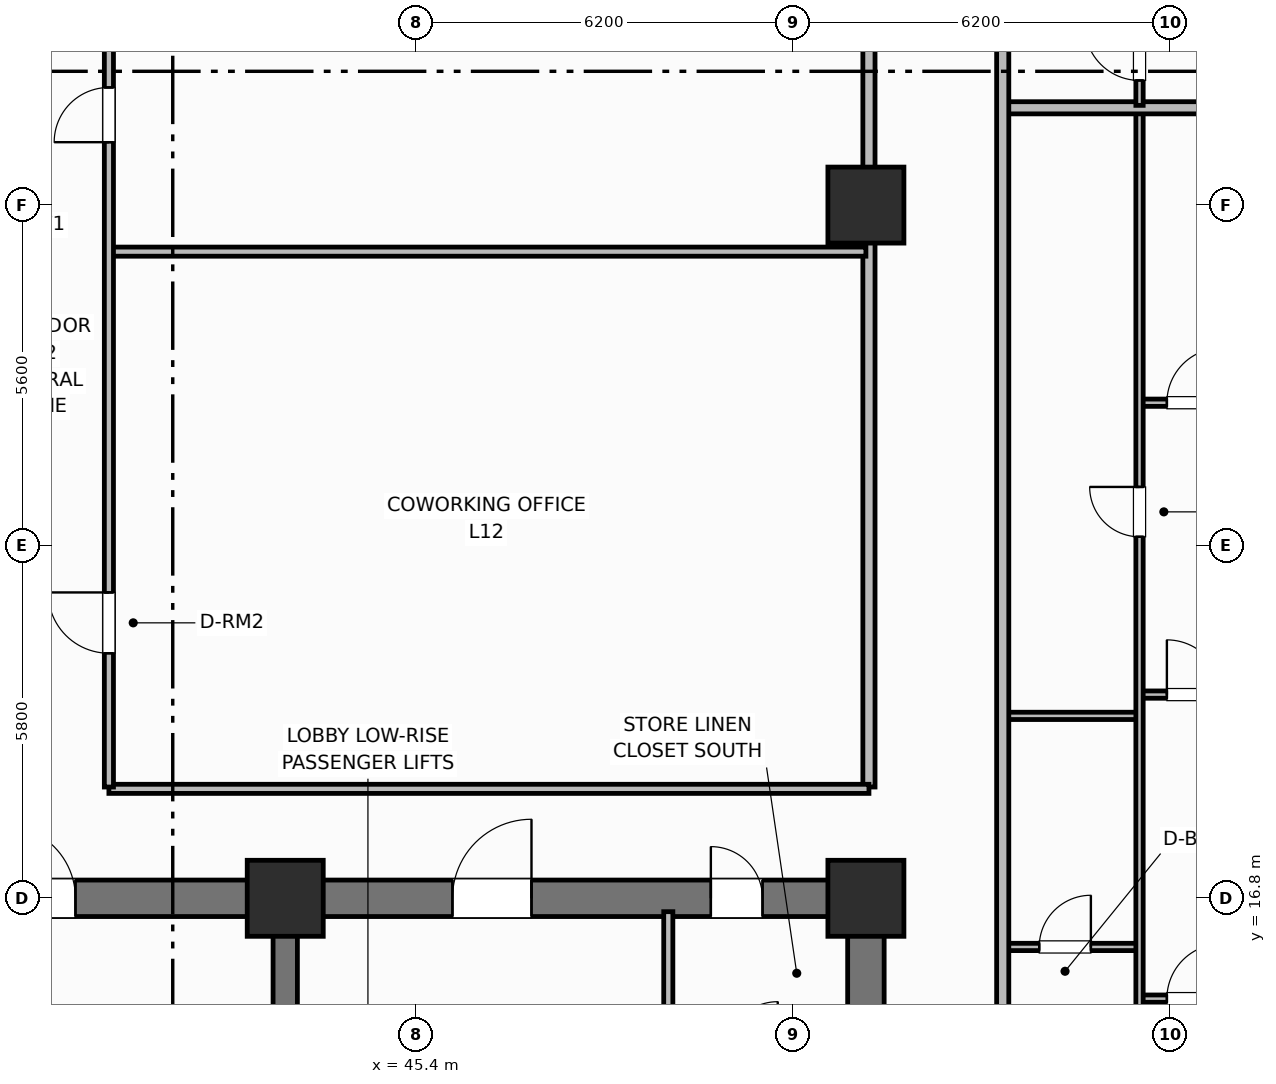
"""IFC4 building model, lengths in metres.
Left out: names, types, materials, properties, quantities, classifications, styles, units other than length and angle.
Written with IfcOpenShell. Run it as: python <this file> out.ifc"""

import sys

from ifc_helpers import new_model, si_unit, direction, frame, frame_2d, origin, origin_2d, place, context, subcontext, project, spatial, rectangle, extrude, element, fill, save


model = new_model("IFC4")
c1 = context("Model", 3, precision=1e-05, world=origin(), true_north=direction((0.0, 1.0)))
c2 = subcontext(c1, "Body", "Model", "MODEL_VIEW")
j1 = project(units=[si_unit("LENGTHUNIT", "METRE"), si_unit("PLANEANGLEUNIT", "RADIAN")], contexts=[c1])
p1 = place(None, origin())
s1 = spatial("IfcSite", under=j1, at=p1, CompositionType="ELEMENT")
p2 = place(p1, origin())
s2 = spatial("IfcBuilding", under=s1, at=p2, CompositionType="ELEMENT")
p3 = place(p2, frame((0.0, 0.0, 51.0)))
s3 = spatial("IfcBuildingStorey", under=s2, at=p3, CompositionType="ELEMENT", Elevation=51.0)
p4 = place(p3, frame((52.8, 10.9, 0.0), z_axis=(0.0, 0.0, 1.0), x_axis=(0.0, 1.0, 0.0)))
e1 = element("IfcWall", 1, at=p4, inside=s3, PredefinedType="SHEAR", context=c2, shape_type="SweptSolid", body=[
    extrude(rectangle(XDim=5.6, YDim=0.6, at=frame_2d((2.8, 0.0))), origin(), (0.0, 0.0, 1.0), 3.7),
])
p5 = place(p3, frame((25.6, 16.8, 0.0), z_axis=(0.0, 0.0, 1.0), x_axis=(1.0, 0.0, 0.0)))
e2 = element("IfcWall", 2, at=p5, inside=s3, PredefinedType="SHEAR", context=c2, shape_type="SweptSolid", body=[
    extrude(rectangle(XDim=27.2, YDim=0.6, at=frame_2d((13.6, 0.0))), origin(), (0.0, 0.0, 1.0), 3.7),
])
p6 = place(p5, frame((1.8, 0.0, 0.0)))
e3 = element("IfcOpeningElement", 3, at=p6, cuts=e2, PredefinedType="OPENING", context=c2, shape_type="SweptSolid", body=[
    extrude(rectangle(XDim=1.1, YDim=2.15, at=frame_2d((0.55, 1.075))), frame((0.0, 0.31, 0.0), z_axis=(0.0, -1.0, 0.0), x_axis=(1.0, 0.0, 0.0)), (0.0, 0.0, 1.0), 0.62),
])
p7 = place(p5, frame((5.6, 0.0, 0.0)))
e4 = element("IfcOpeningElement", 4, at=p7, cuts=e2, PredefinedType="OPENING", context=c2, shape_type="SweptSolid", body=[
    extrude(rectangle(XDim=0.85, YDim=2.1, at=frame_2d((0.425, 1.05))), frame((0.0, 0.31, 0.0), z_axis=(0.0, -1.0, 0.0), x_axis=(1.0, 0.0, 0.0)), (0.0, 0.0, 1.0), 0.62),
])
p8 = place(p5, frame((13.0, 0.0, 0.0)))
e5 = element("IfcOpeningElement", 5, at=p8, cuts=e2, PredefinedType="OPENING", context=c2, shape_type="SweptSolid", body=[
    extrude(rectangle(XDim=1.2, YDim=2.15, at=frame_2d((0.6, 1.075))), frame((0.0, 0.31, 0.0), z_axis=(0.0, -1.0, 0.0), x_axis=(1.0, 0.0, 0.0)), (0.0, 0.0, 1.0), 0.62),
])
p9 = place(p5, frame((20.4, 0.0, 0.0)))
e6 = element("IfcOpeningElement", 6, at=p9, cuts=e2, PredefinedType="OPENING", context=c2, shape_type="SweptSolid", body=[
    extrude(rectangle(XDim=1.3, YDim=2.2, at=frame_2d((0.65, 1.1))), frame((0.0, 0.31, 0.0), z_axis=(0.0, -1.0, 0.0), x_axis=(1.0, 0.0, 0.0)), (0.0, 0.0, 1.0), 0.62),
])
p10 = place(p5, frame((24.65, 0.0, 0.0)))
e7 = element("IfcOpeningElement", 7, at=p10, cuts=e2, PredefinedType="OPENING", context=c2, shape_type="SweptSolid", body=[
    extrude(rectangle(XDim=0.85, YDim=2.1, at=frame_2d((0.425, 1.05))), frame((0.0, 0.31, 0.0), z_axis=(0.0, -1.0, 0.0), x_axis=(1.0, 0.0, 0.0)), (0.0, 0.0, 1.0), 0.62),
])
p11 = place(p3, frame((43.25, 10.9, 0.0), z_axis=(0.0, 0.0, 1.0), x_axis=(0.0, 1.0, 0.0)))
e8 = element("IfcWall", 8, at=p11, inside=s3, PredefinedType="SHEAR", context=c2, shape_type="SweptSolid", body=[
    extrude(rectangle(XDim=5.6, YDim=0.4, at=frame_2d((2.8, 0.0))), origin(), (0.0, 0.0, 1.0), 3.7),
])
for number, where, z_axis, x_axis in (
    (9, (43.25, 16.8, 0.0), (0.0, 0.0, 1.0), (1.0, 0.0, 0.0)),
    (10, (52.8, 16.8, 0.0), (0.0, 0.0, 1.0), (1.0, 0.0, 0.0)),
    (11, (52.8, 28.2, 0.0), (0.0, 0.0, 1.0), (1.0, 0.0, 0.0)),
):
    element("IfcColumn", number, at=place(p3, frame(where, z_axis=z_axis, x_axis=x_axis)), inside=s3, PredefinedType="COLUMN", context=c2, shape_type="SweptSolid", body=[
        extrude(rectangle(XDim=1.25, YDim=1.25, at=origin_2d()), origin(), (0.0, 0.0, 1.0), 3.7),
    ])
p12 = place(p3, frame((49.55, 13.7, 0.0), z_axis=(0.0, 0.0, 1.0), x_axis=(0.0, 1.0, 0.0)))
e12 = element("IfcWall", 12, at=p12, inside=s3, PredefinedType="PARTITIONING", context=c2, shape_type="SweptSolid", body=[
    extrude(rectangle(XDim=2.88, YDim=0.15, at=frame_2d((1.44, 0.0))), origin(), (0.0, 0.0, 1.0), 2.53),
])
p13 = place(p3, frame((52.85, 18.63, 0.0), z_axis=(0.0, 0.0, 1.0), x_axis=(0.0, 1.0, 0.0)))
e13 = element("IfcWall", 13, at=p13, inside=s3, PredefinedType="PARTITIONING", context=c2, shape_type="SweptSolid", body=[
    extrude(rectangle(XDim=19.14, YDim=0.2, at=frame_2d((9.57, 0.0))), origin(), (0.0, 0.0, 1.0), 2.53),
])
p14 = place(p3, frame((40.35, 18.6, 0.0), z_axis=(0.0, 0.0, 1.0), x_axis=(1.0, 0.0, 0.0)))
e14 = element("IfcWall", 14, at=p14, inside=s3, PredefinedType="PARTITIONING", context=c2, shape_type="SweptSolid", body=[
    extrude(rectangle(XDim=12.5, YDim=0.15, at=frame_2d((6.25, 0.0))), origin(), (0.0, 0.0, 1.0), 2.53),
])
p15 = place(p3, frame((40.38, 27.434, 0.0), z_axis=(0.0, 0.0, 1.0), x_axis=(1.0, 0.0, 0.0)))
e15 = element("IfcWall", 15, at=p15, inside=s3, PredefinedType="PARTITIONING", context=c2, shape_type="SweptSolid", body=[
    extrude(rectangle(XDim=12.42, YDim=0.15, at=frame_2d((6.21, 0.0))), origin(), (0.0, 0.0, 1.0), 2.53),
])
p16 = place(p3, frame((40.35, 18.63, 0.0), z_axis=(0.0, 0.0, 1.0), x_axis=(0.0, 1.0, 0.0)))
e16 = element("IfcWall", 16, at=p16, inside=s3, PredefinedType="PARTITIONING", context=c2, shape_type="SweptSolid", body=[
    extrude(rectangle(XDim=19.14, YDim=0.15, at=frame_2d((9.57, 0.0))), origin(), (0.0, 0.0, 1.0), 2.53),
])
p17 = place(p16, frame((2.2, 0.0, 0.0)))
e17 = element("IfcOpeningElement", 17, at=p17, cuts=e16, PredefinedType="OPENING", context=c2, shape_type="SweptSolid", body=[
    extrude(rectangle(XDim=1.0, YDim=2.15, at=frame_2d((0.5, 1.075))), frame((0.0, 0.085, 0.0), z_axis=(0.0, -1.0, 0.0), x_axis=(1.0, 0.0, 0.0)), (0.0, 0.0, 1.0), 0.17),
])
p18 = place(p16, frame((10.604, 0.0, 0.0)))
e18 = element("IfcOpeningElement", 18, at=p18, cuts=e16, PredefinedType="OPENING", context=c2, shape_type="SweptSolid", body=[
    extrude(rectangle(XDim=0.9, YDim=2.1, at=frame_2d((0.45, 1.05))), frame((0.0, 0.085, 0.0), z_axis=(0.0, -1.0, 0.0), x_axis=(1.0, 0.0, 0.0)), (0.0, 0.0, 1.0), 0.17),
])
p19 = place(p3, frame((55.05, 16.0, 0.0), z_axis=(0.0, 0.0, 1.0), x_axis=(1.0, 0.0, 0.0)))
e19 = element("IfcWall", 19, at=p19, inside=s3, PredefinedType="PARTITIONING", context=c2, shape_type="SweptSolid", body=[
    extrude(rectangle(XDim=2.25, YDim=0.12, at=frame_2d((1.125, 0.0))), origin(), (0.0, 0.0, 1.0), 2.53),
])
p20 = place(p19, frame((0.6, 0.0, 0.0)))
e20 = element("IfcOpeningElement", 20, at=p20, cuts=e19, PredefinedType="OPENING", context=c2, shape_type="SweptSolid", body=[
    extrude(rectangle(XDim=0.85, YDim=2.1, at=frame_2d((0.425, 1.05))), frame((0.0, 0.07, 0.0), z_axis=(0.0, -1.0, 0.0), x_axis=(1.0, 0.0, 0.0)), (0.0, 0.0, 1.0), 0.14),
])
p21 = place(p3, frame((55.05, 19.8, 0.0), z_axis=(0.0, 0.0, 1.0), x_axis=(1.0, 0.0, 0.0)))
e21 = element("IfcWall", 21, at=p21, inside=s3, PredefinedType="PARTITIONING", context=c2, shape_type="SweptSolid", body=[
    extrude(rectangle(XDim=2.25, YDim=0.12, at=frame_2d((1.125, 0.0))), origin(), (0.0, 0.0, 1.0), 2.53),
])
p22 = place(p3, frame((57.3, 15.15, 0.0), z_axis=(0.0, 0.0, 1.0), x_axis=(1.0, 0.0, 0.0)))
e22 = element("IfcWall", 22, at=p22, inside=s3, PredefinedType="PARTITIONING", context=c2, shape_type="SweptSolid", body=[
    extrude(rectangle(XDim=6.53, YDim=0.12, at=frame_2d((3.265, 0.0))), origin(), (0.0, 0.0, 1.0), 2.53),
])
p23 = place(p22, frame((0.45, 0.0, 0.0)))
e23 = element("IfcOpeningElement", 23, at=p23, cuts=e22, PredefinedType="OPENING", context=c2, shape_type="SweptSolid", body=[
    extrude(rectangle(XDim=0.9, YDim=2.1, at=frame_2d((0.45, 1.05))), frame((0.0, 0.07, 0.0), z_axis=(0.0, -1.0, 0.0), x_axis=(1.0, 0.0, 0.0)), (0.0, 0.0, 1.0), 0.14),
])
p24 = place(p3, frame((57.3, 20.15, 0.0), z_axis=(0.0, 0.0, 1.0), x_axis=(1.0, 0.0, 0.0)))
e24 = element("IfcWall", 24, at=p24, inside=s3, PredefinedType="PARTITIONING", context=c2, shape_type="SweptSolid", body=[
    extrude(rectangle(XDim=6.53, YDim=0.12, at=frame_2d((3.265, 0.0))), origin(), (0.0, 0.0, 1.0), 2.53),
])
p25 = place(p24, frame((0.45, 0.0, 0.0)))
e25 = element("IfcOpeningElement", 25, at=p25, cuts=e24, PredefinedType="OPENING", context=c2, shape_type="SweptSolid", body=[
    extrude(rectangle(XDim=0.9, YDim=2.1, at=frame_2d((0.45, 1.05))), frame((0.0, 0.07, 0.0), z_axis=(0.0, -1.0, 0.0), x_axis=(1.0, 0.0, 0.0)), (0.0, 0.0, 1.0), 0.14),
])
p26 = place(p3, frame((57.3, 24.95, 0.0), z_axis=(0.0, 0.0, 1.0), x_axis=(1.0, 0.0, 0.0)))
e26 = element("IfcWall", 26, at=p26, inside=s3, PredefinedType="PARTITIONING", context=c2, shape_type="SweptSolid", body=[
    extrude(rectangle(XDim=5.876, YDim=0.12, at=frame_2d((2.938, 0.0))), origin(), (0.0, 0.0, 1.0), 2.53),
])
p27 = place(p26, frame((0.45, 0.0, 0.0)))
e27 = element("IfcOpeningElement", 27, at=p27, cuts=e26, PredefinedType="OPENING", context=c2, shape_type="SweptSolid", body=[
    extrude(rectangle(XDim=0.9, YDim=2.1, at=frame_2d((0.45, 1.05))), frame((0.0, 0.07, 0.0), z_axis=(0.0, -1.0, 0.0), x_axis=(1.0, 0.0, 0.0)), (0.0, 0.0, 1.0), 0.14),
])
p28 = place(p3, frame((57.3, 10.64, 0.0), z_axis=(0.0, 0.0, 1.0), x_axis=(0.0, 1.0, 0.0)))
e28 = element("IfcWall", 28, at=p28, inside=s3, PredefinedType="PARTITIONING", context=c2, shape_type="SweptSolid", body=[
    extrude(rectangle(XDim=19.12, YDim=0.12, at=frame_2d((9.56, 0.0))), origin(), (0.0, 0.0, 1.0), 2.53),
])
p29 = place(p28, frame((0.41, 0.0, 0.0)))
e29 = element("IfcOpeningElement", 29, at=p29, cuts=e28, PredefinedType="OPENING", context=c2, shape_type="SweptSolid", body=[
    extrude(rectangle(XDim=0.9, YDim=2.1, at=frame_2d((0.45, 1.05))), frame((0.0, 0.07, 0.0), z_axis=(0.0, -1.0, 0.0), x_axis=(1.0, 0.0, 0.0)), (0.0, 0.0, 1.0), 0.14),
])
p30 = place(p28, frame((12.105, 0.0, 0.0)))
e30 = element("IfcOpeningElement", 30, at=p30, cuts=e28, PredefinedType="OPENING", context=c2, shape_type="SweptSolid", body=[
    extrude(rectangle(XDim=0.82, YDim=2.08, at=frame_2d((0.41, 1.04))), frame((0.0, 0.07, 0.0), z_axis=(0.0, -1.0, 0.0), x_axis=(1.0, 0.0, 0.0)), (0.0, 0.0, 1.0), 0.14),
])
p31 = place(p3, frame((55.05, 29.8, 0.0), z_axis=(0.0, 0.0, 1.0), x_axis=(1.0, 0.0, 0.0)))
e31 = element("IfcWall", 31, at=p31, inside=s3, PredefinedType="PARTITIONING", context=c2, shape_type="SweptSolid", body=[
    extrude(rectangle(XDim=8.066, YDim=0.2, at=frame_2d((4.033, 0.0))), origin(), (0.0, 0.0, 1.0), 2.53),
])
p32 = place(p3, frame((57.3, 29.84, 0.0), z_axis=(0.0, 0.0, 1.0), x_axis=(0.0, 1.0, 0.0)))
e32 = element("IfcWall", 32, at=p32, inside=s3, PredefinedType="PARTITIONING", context=c2, shape_type="SweptSolid", body=[
    extrude(rectangle(XDim=15.92, YDim=0.12, at=frame_2d((7.96, 0.0))), origin(), (0.0, 0.0, 1.0), 2.53),
])
p33 = place(p32, frame((0.41, 0.0, 0.0)))
e33 = element("IfcOpeningElement", 33, at=p33, cuts=e32, PredefinedType="OPENING", context=c2, shape_type="SweptSolid", body=[
    extrude(rectangle(XDim=0.9, YDim=2.1, at=frame_2d((0.45, 1.05))), frame((0.0, 0.07, 0.0), z_axis=(0.0, -1.0, 0.0), x_axis=(1.0, 0.0, 0.0)), (0.0, 0.0, 1.0), 0.14),
])
p34 = place(p32, frame((13.125, 0.0, 0.0)))
e34 = element("IfcOpeningElement", 34, at=p34, cuts=e32, PredefinedType="OPENING", context=c2, shape_type="SweptSolid", body=[
    extrude(rectangle(XDim=0.82, YDim=2.08, at=frame_2d((0.41, 1.04))), frame((0.0, 0.07, 0.0), z_axis=(0.0, -1.0, 0.0), x_axis=(1.0, 0.0, 0.0)), (0.0, 0.0, 1.0), 0.14),
])
p35 = place(p3, frame((55.05, 10.6, 0.0), z_axis=(0.0, 0.0, 1.0), x_axis=(0.0, 1.0, 0.0)))
e35 = element("IfcWall", 35, at=p35, inside=s3, PredefinedType="PARTITIONING", context=c2, shape_type="SweptSolid", body=[
    extrude(rectangle(XDim=35.2, YDim=0.2, at=frame_2d((17.6, 0.0))), origin(), (0.0, 0.0, 1.0), 2.53),
])
p36 = place(p35, frame((2.65, 0.0, 0.0)))
e36 = element("IfcOpeningElement", 36, at=p36, cuts=e35, PredefinedType="OPENING", context=c2, shape_type="SweptSolid", body=[
    extrude(rectangle(XDim=1.0, YDim=2.15, at=frame_2d((0.5, 1.075))), frame((0.0, 0.11, 0.0), z_axis=(0.0, -1.0, 0.0), x_axis=(1.0, 0.0, 0.0)), (0.0, 0.0, 1.0), 0.22),
])
p37 = place(p35, frame((22.75, 0.0, 0.0)))
e37 = element("IfcOpeningElement", 37, at=p37, cuts=e35, PredefinedType="OPENING", context=c2, shape_type="SweptSolid", body=[
    extrude(rectangle(XDim=1.0, YDim=2.15, at=frame_2d((0.5, 1.075))), frame((0.0, 0.11, 0.0), z_axis=(0.0, -1.0, 0.0), x_axis=(1.0, 0.0, 0.0)), (0.0, 0.0, 1.0), 0.22),
])
p38 = place(p17, origin())
e38 = element("IfcDoor", 38, at=p38, inside=s3, OperationType="SINGLE_SWING_RIGHT", PredefinedType="DOOR", context=c2, shape_type="SweptSolid", body=[
    extrude(rectangle(XDim=1.0, YDim=2.15, at=frame_2d((0.5, 1.075))), frame((0.0, 0.025, 0.0), z_axis=(0.0, -1.0, 0.0), x_axis=(1.0, 0.0, 0.0)), (0.0, 0.0, 1.0), 0.05),
])
fill(e17, e38)
p39 = place(p18, origin())
e39 = element("IfcDoor", 39, at=p39, inside=s3, OperationType="SINGLE_SWING_LEFT", PredefinedType="DOOR", context=c2, shape_type="SweptSolid", body=[
    extrude(rectangle(XDim=0.9, YDim=2.1, at=frame_2d((0.45, 1.05))), frame((0.0, 0.025, 0.0), z_axis=(0.0, -1.0, 0.0), x_axis=(1.0, 0.0, 0.0)), (0.0, 0.0, 1.0), 0.05),
])
fill(e18, e39)
p40 = place(p20, origin())
e40 = element("IfcDoor", 40, at=p40, inside=s3, OperationType="SINGLE_SWING_RIGHT", PredefinedType="DOOR", context=c2, shape_type="SweptSolid", body=[
    extrude(rectangle(XDim=0.85, YDim=2.1, at=frame_2d((0.425, 1.05))), frame((0.0, 0.025, 0.0), z_axis=(0.0, -1.0, 0.0), x_axis=(1.0, 0.0, 0.0)), (0.0, 0.0, 1.0), 0.05),
])
fill(e20, e40)
p41 = place(p23, origin())
e41 = element("IfcDoor", 41, at=p41, inside=s3, OperationType="SINGLE_SWING_RIGHT", PredefinedType="DOOR", context=c2, shape_type="SweptSolid", body=[
    extrude(rectangle(XDim=0.9, YDim=2.1, at=frame_2d((0.45, 1.05))), frame((0.0, 0.025, 0.0), z_axis=(0.0, -1.0, 0.0), x_axis=(1.0, 0.0, 0.0)), (0.0, 0.0, 1.0), 0.05),
])
fill(e23, e41)
p42 = place(p25, origin())
e42 = element("IfcDoor", 42, at=p42, inside=s3, OperationType="SINGLE_SWING_LEFT", PredefinedType="DOOR", context=c2, shape_type="SweptSolid", body=[
    extrude(rectangle(XDim=0.9, YDim=2.1, at=frame_2d((0.45, 1.05))), frame((0.0, 0.025, 0.0), z_axis=(0.0, -1.0, 0.0), x_axis=(1.0, 0.0, 0.0)), (0.0, 0.0, 1.0), 0.05),
])
fill(e25, e42)
p43 = place(p27, origin())
e43 = element("IfcDoor", 43, at=p43, inside=s3, OperationType="SINGLE_SWING_RIGHT", PredefinedType="DOOR", context=c2, shape_type="SweptSolid", body=[
    extrude(rectangle(XDim=0.9, YDim=2.1, at=frame_2d((0.45, 1.05))), frame((0.0, 0.025, 0.0), z_axis=(0.0, -1.0, 0.0), x_axis=(1.0, 0.0, 0.0)), (0.0, 0.0, 1.0), 0.05),
])
fill(e27, e43)
p44 = place(p30, origin())
e44 = element("IfcDoor", 44, at=p44, inside=s3, OperationType="SINGLE_SWING_RIGHT", PredefinedType="DOOR", context=c2, shape_type="SweptSolid", body=[
    extrude(rectangle(XDim=0.82, YDim=2.08, at=frame_2d((0.41, 1.04))), frame((0.0, 0.025, 0.0), z_axis=(0.0, -1.0, 0.0), x_axis=(1.0, 0.0, 0.0)), (0.0, 0.0, 1.0), 0.05),
])
fill(e30, e44)
p45 = place(p33, origin())
e45 = element("IfcDoor", 45, at=p45, inside=s3, OperationType="SINGLE_SWING_RIGHT", PredefinedType="DOOR", context=c2, shape_type="SweptSolid", body=[
    extrude(rectangle(XDim=0.9, YDim=2.1, at=frame_2d((0.45, 1.05))), frame((0.0, 0.025, 0.0), z_axis=(0.0, -1.0, 0.0), x_axis=(1.0, 0.0, 0.0)), (0.0, 0.0, 1.0), 0.05),
])
fill(e33, e45)
p46 = place(p8, origin())
e46 = element("IfcDoor", 46, at=p46, inside=s3, OperationType="SINGLE_SWING_LEFT", PredefinedType="DOOR", context=c2, shape_type="SweptSolid", body=[
    extrude(rectangle(XDim=1.2, YDim=2.15, at=frame_2d((0.6, 1.075))), frame((0.0, 0.025, 0.0), z_axis=(0.0, -1.0, 0.0), x_axis=(1.0, 0.0, 0.0)), (0.0, 0.0, 1.0), 0.05),
])
fill(e5, e46)
p47 = place(p9, origin())
e47 = element("IfcDoor", 47, at=p47, inside=s3, OperationType="SINGLE_SWING_RIGHT", PredefinedType="DOOR", context=c2, shape_type="SweptSolid", body=[
    extrude(rectangle(XDim=1.3, YDim=2.2, at=frame_2d((0.65, 1.1))), frame((0.0, 0.025, 0.0), z_axis=(0.0, -1.0, 0.0), x_axis=(1.0, 0.0, 0.0)), (0.0, 0.0, 1.0), 0.05),
])
fill(e6, e47)
p48 = place(p10, origin())
e48 = element("IfcDoor", 48, at=p48, inside=s3, OperationType="SINGLE_SWING_LEFT", PredefinedType="DOOR", context=c2, shape_type="SweptSolid", body=[
    extrude(rectangle(XDim=0.85, YDim=2.1, at=frame_2d((0.425, 1.05))), frame((0.0, 0.025, 0.0), z_axis=(0.0, -1.0, 0.0), x_axis=(1.0, 0.0, 0.0)), (0.0, 0.0, 1.0), 0.05),
])
fill(e7, e48)
save(model, sys.argv[1])
